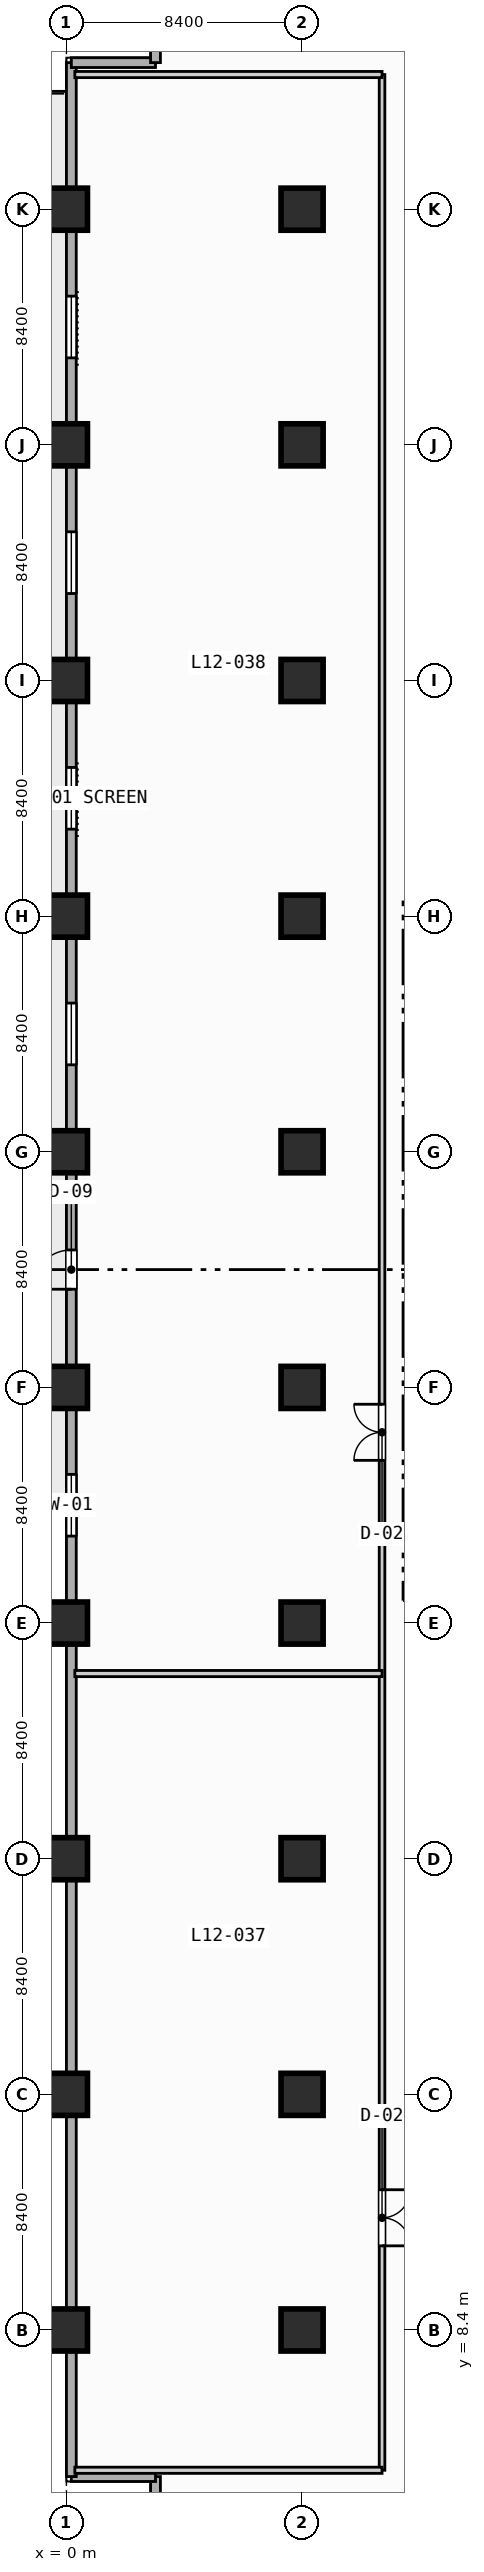
"""IFC4 building model, lengths in metres.
Left out: names, types, materials, properties, quantities, classifications, styles, units other than length and angle.
Written with IfcOpenShell. Run it as: python <this file> out.ifc"""

import sys

from ifc_helpers import new_model, si_unit, direction, frame, frame_2d, origin, origin_2d, place, context, subcontext, project, spatial, rectangle, extrude, element, fill, save


model = new_model("IFC4")
c1 = context("Model", 3, precision=1e-05, world=origin(), true_north=direction((0.0, 1.0)))
c2 = subcontext(c1, "Body", "Model", "MODEL_VIEW")
j1 = project(units=[si_unit("LENGTHUNIT", "METRE"), si_unit("PLANEANGLEUNIT", "RADIAN")], contexts=[c1])
p1 = place(None, origin())
s1 = spatial("IfcSite", under=j1, at=p1, CompositionType="ELEMENT")
p2 = place(p1, origin())
s2 = spatial("IfcBuilding", under=s1, at=p2, CompositionType="ELEMENT")
p3 = place(p2, frame((0.0, 0.0, 54.8)))
s3 = spatial("IfcBuildingStorey", under=s2, at=p3, CompositionType="ELEMENT", Elevation=54.8)
for number, where, z_axis, x_axis in (
    (1, (0.0, 8.4, 0.0), (0.0, 0.0, 1.0), (1.0, 0.0, 0.0)),
    (2, (0.0, 16.8, 0.0), (0.0, 0.0, 1.0), (1.0, 0.0, 0.0)),
    (3, (0.0, 25.2, 0.0), (0.0, 0.0, 1.0), (1.0, 0.0, 0.0)),
    (4, (0.0, 33.6, 0.0), (0.0, 0.0, 1.0), (1.0, 0.0, 0.0)),
    (5, (0.0, 42.0, 0.0), (0.0, 0.0, 1.0), (1.0, 0.0, 0.0)),
    (6, (0.0, 50.4, 0.0), (0.0, 0.0, 1.0), (1.0, 0.0, 0.0)),
    (7, (0.0, 58.8, 0.0), (0.0, 0.0, 1.0), (1.0, 0.0, 0.0)),
    (8, (0.0, 67.2, 0.0), (0.0, 0.0, 1.0), (1.0, 0.0, 0.0)),
    (9, (0.0, 75.6, 0.0), (0.0, 0.0, 1.0), (1.0, 0.0, 0.0)),
    (10, (0.0, 84.0, 0.0), (0.0, 0.0, 1.0), (1.0, 0.0, 0.0)),
    (11, (8.4, 8.4, 0.0), (0.0, 0.0, 1.0), (1.0, 0.0, 0.0)),
    (12, (8.4, 16.8, 0.0), (0.0, 0.0, 1.0), (1.0, 0.0, 0.0)),
    (13, (8.4, 25.2, 0.0), (0.0, 0.0, 1.0), (1.0, 0.0, 0.0)),
    (14, (8.4, 33.6, 0.0), (0.0, 0.0, 1.0), (1.0, 0.0, 0.0)),
    (15, (8.4, 42.0, 0.0), (0.0, 0.0, 1.0), (1.0, 0.0, 0.0)),
    (16, (8.4, 50.4, 0.0), (0.0, 0.0, 1.0), (1.0, 0.0, 0.0)),
    (17, (8.4, 58.8, 0.0), (0.0, 0.0, 1.0), (1.0, 0.0, 0.0)),
    (18, (8.4, 67.2, 0.0), (0.0, 0.0, 1.0), (1.0, 0.0, 0.0)),
    (19, (8.4, 75.6, 0.0), (0.0, 0.0, 1.0), (1.0, 0.0, 0.0)),
    (20, (8.4, 84.0, 0.0), (0.0, 0.0, 1.0), (1.0, 0.0, 0.0)),
):
    element("IfcColumn", number, at=place(p3, frame(where, z_axis=z_axis, x_axis=x_axis)), inside=s3, PredefinedType="COLUMN", context=c2, shape_type="SweptSolid", body=[
        extrude(rectangle(XDim=1.5, YDim=1.5, at=origin_2d()), origin(), (0.0, 0.0, 1.0), 3.8),
    ])
for number, where, z_axis, x_axis in (
    (21, (3.175, 0.175, 0.0), (0.0, 0.0, 1.0), (0.0, 1.0, 0.0)),
    (22, (3.175, 3.175, 0.0), (0.0, 0.0, 1.0), (-1.0, 0.0, 0.0)),
):
    element("IfcWall", number, at=place(p3, frame(where, z_axis=z_axis, x_axis=x_axis)), inside=s3, PredefinedType="STANDARD", context=c2, shape_type="SweptSolid", body=[
        extrude(rectangle(XDim=3.0, YDim=0.35, at=frame_2d((1.5, 0.0))), origin(), (0.0, 0.0, 1.0), 3.55),
    ])
p4 = place(p3, frame((0.175, 3.175, 0.0), z_axis=(0.0, 0.0, 1.0), x_axis=(0.0, 1.0, 0.0)))
e23 = element("IfcWall", 23, at=p4, inside=s3, PredefinedType="STANDARD", context=c2, shape_type="SweptSolid", body=[
    extrude(rectangle(XDim=86.05, YDim=0.35, at=frame_2d((43.025, 0.0))), origin(), (0.0, 0.0, 1.0), 3.55),
])
p5 = place(p4, frame((42.325, 0.0, 0.0)))
e24 = element("IfcOpeningElement", 24, at=p5, cuts=e23, PredefinedType="OPENING", context=c2, shape_type="SweptSolid", body=[
    extrude(rectangle(XDim=1.4, YDim=2.2, at=frame_2d((0.7, 1.1))), frame((0.0, 0.185, 0.0), z_axis=(0.0, -1.0, 0.0), x_axis=(1.0, 0.0, 0.0)), (0.0, 0.0, 1.0), 0.37),
])
p6 = place(p4, frame((33.525, 0.0, 0.85)))
e25 = element("IfcOpeningElement", 25, at=p6, cuts=e23, PredefinedType="OPENING", context=c2, shape_type="SweptSolid", body=[
    extrude(rectangle(XDim=2.2, YDim=1.8, at=frame_2d((1.1, 0.9))), frame((0.0, 0.185, 0.0), z_axis=(0.0, -1.0, 0.0), x_axis=(1.0, 0.0, 0.0)), (0.0, 0.0, 1.0), 0.37),
])
p7 = place(p4, frame((50.325, 0.0, 0.85)))
e26 = element("IfcOpeningElement", 26, at=p7, cuts=e23, PredefinedType="OPENING", context=c2, shape_type="SweptSolid", body=[
    extrude(rectangle(XDim=2.2, YDim=1.8, at=frame_2d((1.1, 0.9))), frame((0.0, 0.185, 0.0), z_axis=(0.0, -1.0, 0.0), x_axis=(1.0, 0.0, 0.0)), (0.0, 0.0, 1.0), 0.37),
])
p8 = place(p4, frame((58.725, 0.0, 0.85)))
e27 = element("IfcOpeningElement", 27, at=p8, cuts=e23, PredefinedType="OPENING", context=c2, shape_type="SweptSolid", body=[
    extrude(rectangle(XDim=2.2, YDim=1.8, at=frame_2d((1.1, 0.9))), frame((0.0, 0.185, 0.0), z_axis=(0.0, -1.0, 0.0), x_axis=(1.0, 0.0, 0.0)), (0.0, 0.0, 1.0), 0.37),
])
p9 = place(p4, frame((67.125, 0.0, 0.85)))
e28 = element("IfcOpeningElement", 28, at=p9, cuts=e23, PredefinedType="OPENING", context=c2, shape_type="SweptSolid", body=[
    extrude(rectangle(XDim=2.2, YDim=1.8, at=frame_2d((1.1, 0.9))), frame((0.0, 0.185, 0.0), z_axis=(0.0, -1.0, 0.0), x_axis=(1.0, 0.0, 0.0)), (0.0, 0.0, 1.0), 0.37),
])
p10 = place(p4, frame((75.525, 0.0, 0.85)))
e29 = element("IfcOpeningElement", 29, at=p10, cuts=e23, PredefinedType="OPENING", context=c2, shape_type="SweptSolid", body=[
    extrude(rectangle(XDim=2.2, YDim=1.8, at=frame_2d((1.1, 0.9))), frame((0.0, 0.185, 0.0), z_axis=(0.0, -1.0, 0.0), x_axis=(1.0, 0.0, 0.0)), (0.0, 0.0, 1.0), 0.37),
])
for number, where, z_axis, x_axis in (
    (30, (0.175, 89.225, 0.0), (0.0, 0.0, 1.0), (1.0, 0.0, 0.0)),
    (31, (3.175, 89.225, 0.0), (0.0, 0.0, 1.0), (0.0, 1.0, 0.0)),
):
    element("IfcWall", number, at=place(p3, frame(where, z_axis=z_axis, x_axis=x_axis)), inside=s3, PredefinedType="STANDARD", context=c2, shape_type="SweptSolid", body=[
        extrude(rectangle(XDim=3.0, YDim=0.35, at=frame_2d((1.5, 0.0))), origin(), (0.0, 0.0, 1.0), 3.55),
    ])
p11 = place(p3, frame((11.25, 3.4, 0.0), z_axis=(0.0, 0.0, 1.0), x_axis=(0.0, 1.0, 0.0)))
e32 = element("IfcWall", 32, at=p11, inside=s3, PredefinedType="PARTITIONING", context=c2, shape_type="SweptSolid", body=[
    extrude(rectangle(XDim=85.4, YDim=0.2, at=frame_2d((42.7, 0.0))), origin(), (0.0, 0.0, 1.0), 3.55),
])
p12 = place(p11, frame((8.0, 0.0, 0.0)))
e33 = element("IfcOpeningElement", 33, at=p12, cuts=e32, PredefinedType="OPENING", context=c2, shape_type="SweptSolid", body=[
    extrude(rectangle(XDim=2.0, YDim=2.15, at=frame_2d((1.0, 1.075))), frame((0.0, 0.11, 0.0), z_axis=(0.0, -1.0, 0.0), x_axis=(1.0, 0.0, 0.0)), (0.0, 0.0, 1.0), 0.22),
])
p13 = place(p11, frame((36.0, 0.0, 0.0)))
e34 = element("IfcOpeningElement", 34, at=p13, cuts=e32, PredefinedType="OPENING", context=c2, shape_type="SweptSolid", body=[
    extrude(rectangle(XDim=2.0, YDim=2.15, at=frame_2d((1.0, 1.075))), frame((0.0, 0.11, 0.0), z_axis=(0.0, -1.0, 0.0), x_axis=(1.0, 0.0, 0.0)), (0.0, 0.0, 1.0), 0.22),
])
for number, where, z_axis, x_axis in (
    (35, (0.3, 3.4, 0.0), (0.0, 0.0, 1.0), (1.0, 0.0, 0.0)),
    (36, (0.3, 31.8, 0.0), (0.0, 0.0, 1.0), (1.0, 0.0, 0.0)),
    (37, (0.3, 88.8, 0.0), (0.0, 0.0, 1.0), (1.0, 0.0, 0.0)),
):
    element("IfcWall", number, at=place(p3, frame(where, z_axis=z_axis, x_axis=x_axis)), inside=s3, PredefinedType="PARTITIONING", context=c2, shape_type="SweptSolid", body=[
        extrude(rectangle(XDim=10.95, YDim=0.22, at=frame_2d((5.475, 0.0))), origin(), (0.0, 0.0, 1.0), 3.55),
    ])
p14 = place(p5, origin())
e38 = element("IfcDoor", 38, at=p14, inside=s3, OperationType="SINGLE_SWING_LEFT", PredefinedType="DOOR", context=c2, shape_type="SweptSolid", body=[
    extrude(rectangle(XDim=1.4, YDim=2.2, at=frame_2d((0.7, 1.1))), frame((0.0, 0.025, 0.0), z_axis=(0.0, -1.0, 0.0), x_axis=(1.0, 0.0, 0.0)), (0.0, 0.0, 1.0), 0.05),
])
fill(e24, e38)
p15 = place(p6, origin())
e39 = element("IfcWindow", 39, at=p15, inside=s3, PartitioningType="SINGLE_PANEL", PredefinedType="WINDOW", context=c2, shape_type="SweptSolid", body=[
    extrude(rectangle(XDim=2.2, YDim=1.8, at=frame_2d((1.1, 0.9))), frame((0.0, 0.03, 0.0), z_axis=(0.0, -1.0, 0.0), x_axis=(1.0, 0.0, 0.0)), (0.0, 0.0, 1.0), 0.06),
])
fill(e25, e39)
p16 = place(p7, origin())
e40 = element("IfcWindow", 40, at=p16, inside=s3, PartitioningType="SINGLE_PANEL", PredefinedType="WINDOW", context=c2, shape_type="SweptSolid", body=[
    extrude(rectangle(XDim=2.2, YDim=1.8, at=frame_2d((1.1, 0.9))), frame((0.0, 0.03, 0.0), z_axis=(0.0, -1.0, 0.0), x_axis=(1.0, 0.0, 0.0)), (0.0, 0.0, 1.0), 0.06),
])
fill(e26, e40)
p17 = place(p8, origin())
e41 = element("IfcWindow", 41, at=p17, inside=s3, PartitioningType="SINGLE_PANEL", PredefinedType="WINDOW", context=c2, shape_type="SweptSolid", body=[
    extrude(rectangle(XDim=2.2, YDim=1.8, at=frame_2d((1.1, 0.9))), frame((0.0, 0.03, 0.0), z_axis=(0.0, -1.0, 0.0), x_axis=(1.0, 0.0, 0.0)), (0.0, 0.0, 1.0), 0.06),
])
fill(e27, e41)
p18 = place(p9, origin())
e42 = element("IfcWindow", 42, at=p18, inside=s3, PartitioningType="SINGLE_PANEL", PredefinedType="WINDOW", context=c2, shape_type="SweptSolid", body=[
    extrude(rectangle(XDim=2.2, YDim=1.8, at=frame_2d((1.1, 0.9))), frame((0.0, 0.03, 0.0), z_axis=(0.0, -1.0, 0.0), x_axis=(1.0, 0.0, 0.0)), (0.0, 0.0, 1.0), 0.06),
])
fill(e28, e42)
p19 = place(p10, origin())
e43 = element("IfcWindow", 43, at=p19, inside=s3, PartitioningType="SINGLE_PANEL", PredefinedType="WINDOW", context=c2, shape_type="SweptSolid", body=[
    extrude(rectangle(XDim=2.2, YDim=1.8, at=frame_2d((1.1, 0.9))), frame((0.0, 0.03, 0.0), z_axis=(0.0, -1.0, 0.0), x_axis=(1.0, 0.0, 0.0)), (0.0, 0.0, 1.0), 0.06),
])
fill(e29, e43)
p20 = place(p12, origin())
e44 = element("IfcDoor", 44, at=p20, inside=s3, OperationType="SINGLE_SWING_RIGHT", PredefinedType="DOOR", context=c2, shape_type="SweptSolid", body=[
    extrude(rectangle(XDim=2.0, YDim=2.15, at=frame_2d((1.0, 1.075))), frame((0.0, 0.025, 0.0), z_axis=(0.0, -1.0, 0.0), x_axis=(1.0, 0.0, 0.0)), (0.0, 0.0, 1.0), 0.05),
])
fill(e33, e44)
p21 = place(p13, origin())
e45 = element("IfcDoor", 45, at=p21, inside=s3, OperationType="SINGLE_SWING_LEFT", PredefinedType="DOOR", context=c2, shape_type="SweptSolid", body=[
    extrude(rectangle(XDim=2.0, YDim=2.15, at=frame_2d((1.0, 1.075))), frame((0.0, 0.025, 0.0), z_axis=(0.0, -1.0, 0.0), x_axis=(1.0, 0.0, 0.0)), (0.0, 0.0, 1.0), 0.05),
])
fill(e34, e45)
save(model, sys.argv[1])
